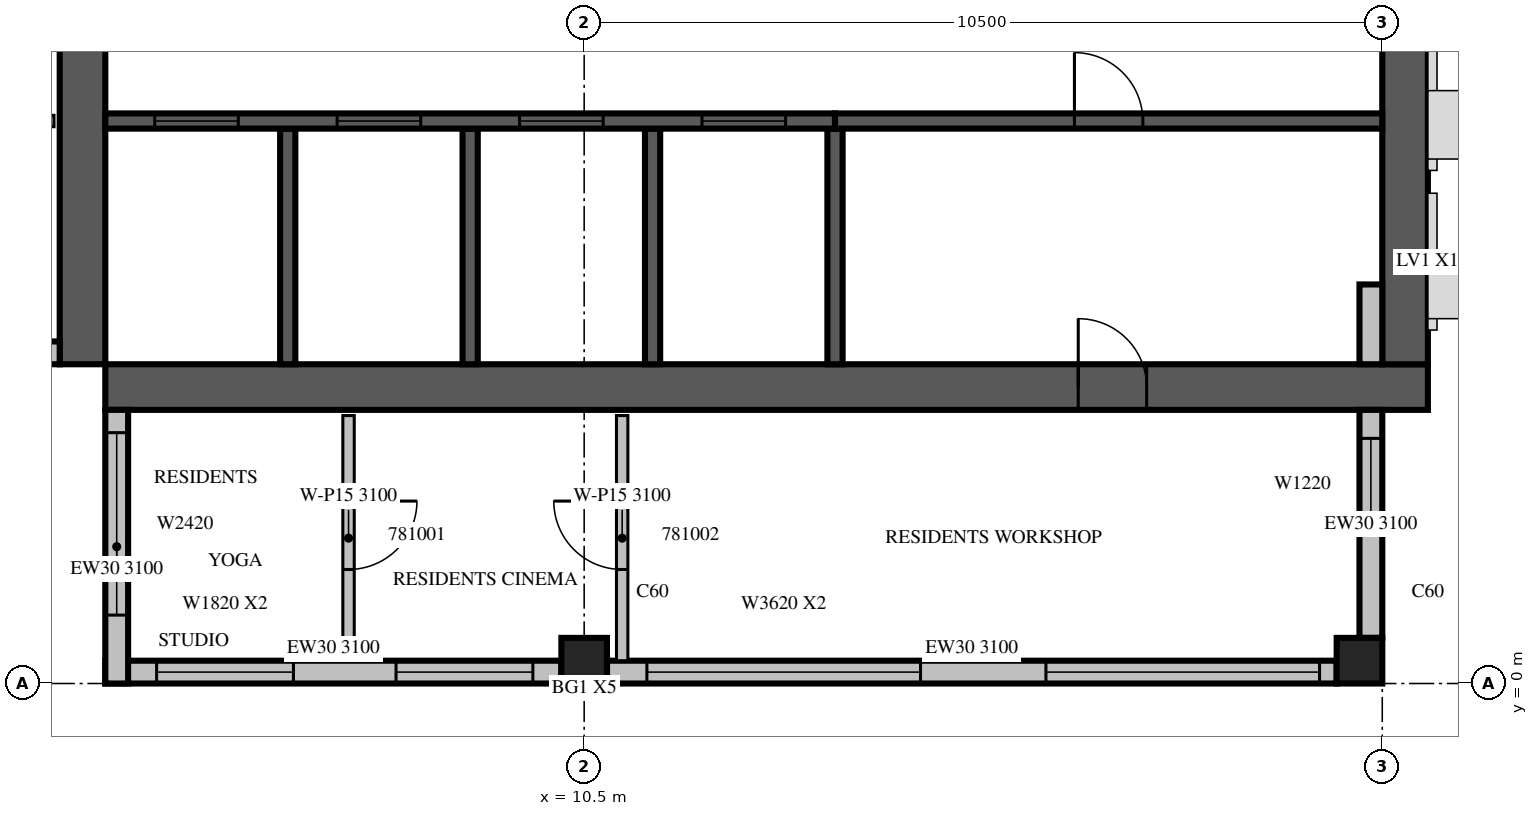
"""IFC4 building model, lengths in metres.
Left out: names, types, materials, properties, quantities, classifications, styles, units other than length and angle.
Written with IfcOpenShell. Run it as: python <this file> out.ifc"""

import sys

from ifc_helpers import new_model, si_unit, direction, frame, frame_2d, origin, origin_2d, place, context, subcontext, project, spatial, rectangle, extrude, source, transform, mapped, element, fill, save


model = new_model("IFC4")
c1 = context("Model", 3, precision=1e-05, world=origin(), true_north=direction((0.0, 1.0)))
c2 = subcontext(c1, "Body", "Model", "MODEL_VIEW")
j1 = project(units=[si_unit("LENGTHUNIT", "METRE"), si_unit("PLANEANGLEUNIT", "RADIAN")], contexts=[c1])
p1 = place(None, origin())
s1 = spatial("IfcSite", under=j1, at=p1, CompositionType="ELEMENT")
p2 = place(p1, origin())
s2 = spatial("IfcBuilding", under=s1, at=p2, CompositionType="ELEMENT")
p3 = place(p2, frame((0.0, 0.0, 344.0)))
s3 = spatial("IfcBuildingStorey", under=s2, at=p3, CompositionType="ELEMENT", Elevation=344.0)
m1 = source(origin(), c2, "Body", "SweptSolid", [
    extrude(rectangle(XDim=0.6, YDim=0.6, at=origin_2d()), origin(), (0.0, 0.0, 1.0), 3.5),
])
for number, where, z_axis, x_axis in (
    (1, (10.5, 0.3, 0.0), (0.0, 0.0, 1.0), (1.0, 0.0, 0.0)),
    (2, (20.7, 0.3, 0.0), (0.0, 0.0, 1.0), (1.0, 0.0, 0.0)),
):
    element("IfcColumn", number, at=place(p3, frame(where, z_axis=z_axis, x_axis=x_axis)), inside=s3, PredefinedType="COLUMN", context=c2, shape_type="MappedRepresentation", body=[
        mapped(m1, transform((0.0, 0.0, 0.0), scale=1.0)),
    ])
m2 = source(origin(), c2, "Body", "SweptSolid", [
    extrude(rectangle(XDim=17.4, YDim=0.6, at=frame_2d((8.7, 0.0))), origin(), (0.0, 0.0, 1.0), 3.5),
])
p4 = place(p3, frame((3.9, 4.2, 0.0), z_axis=(0.0, 0.0, 1.0), x_axis=(0.0, 1.0, 0.0)))
e3 = element("IfcWall", 3, at=p4, inside=s3, PredefinedType="SHEAR", context=c2, shape_type="MappedRepresentation", body=[
    mapped(m2, transform((0.0, 0.0, 0.0), scale=1.0)),
])
m3 = source(origin(), c2, "Body", "SweptSolid", [
    extrude(rectangle(XDim=2.2, YDim=2.1, at=frame_2d((1.1, 1.05))), frame((0.0, 0.31, 0.0), z_axis=(0.0, -1.0, 0.0), x_axis=(1.0, 0.0, 0.0)), (0.0, 0.0, 1.0), 0.62),
])
p5 = place(p4, frame((4.2, 0.0, 0.0)))
e4 = element("IfcOpeningElement", 4, at=p5, cuts=e3, PredefinedType="OPENING", context=c2, shape_type="MappedRepresentation", body=[
    mapped(m3, transform((0.0, 0.0, 0.0), scale=1.0)),
])
p6 = place(p3, frame((4.2, 3.9, 0.0), z_axis=(0.0, 0.0, 1.0), x_axis=(1.0, 0.0, 0.0)))
e5 = element("IfcWall", 5, at=p6, inside=s3, PredefinedType="SHEAR", context=c2, shape_type="MappedRepresentation", body=[
    mapped(m2, transform((0.0, 0.0, 0.0), scale=1.0)),
])
m4 = source(origin(), c2, "Body", "SweptSolid", [
    extrude(rectangle(XDim=0.9, YDim=2.1, at=frame_2d((0.45, 1.05))), frame((0.0, 0.31, 0.0), z_axis=(0.0, -1.0, 0.0), x_axis=(1.0, 0.0, 0.0)), (0.0, 0.0, 1.0), 0.62),
])
p7 = place(p6, frame((12.8, 0.0, 0.0)))
e6 = element("IfcOpeningElement", 6, at=p7, cuts=e5, PredefinedType="OPENING", context=c2, shape_type="MappedRepresentation", body=[
    mapped(m4, transform((0.0, 0.0, 0.0), scale=1.0)),
])
m5 = source(origin(), c2, "Body", "SweptSolid", [
    extrude(rectangle(XDim=16.8, YDim=0.6, at=frame_2d((8.4, 0.0))), origin(), (0.0, 0.0, 1.0), 3.5),
])
p8 = place(p3, frame((21.3, 4.2, 0.0), z_axis=(0.0, 0.0, 1.0), x_axis=(0.0, 1.0, 0.0)))
e7 = element("IfcWall", 7, at=p8, inside=s3, PredefinedType="SHEAR", context=c2, shape_type="MappedRepresentation", body=[
    mapped(m5, transform((0.0, 0.0, 0.0), scale=1.0)),
])
m6 = source(origin(), c2, "Body", "SweptSolid", [
    extrude(rectangle(XDim=1.2, YDim=2.4, at=frame_2d((0.6, 1.2))), frame((0.0, 0.31, 0.0), z_axis=(0.0, -1.0, 0.0), x_axis=(1.0, 0.0, 0.0)), (0.0, 0.0, 1.0), 0.62),
])
p9 = place(p8, frame((12.0, 0.0, 0.6)))
e8 = element("IfcOpeningElement", 8, at=p9, cuts=e7, PredefinedType="OPENING", context=c2, shape_type="MappedRepresentation", body=[
    mapped(m6, transform((0.0, 0.0, 0.0), scale=1.0)),
])
m7 = source(origin(), c2, "Body", "SweptSolid", [
    extrude(rectangle(XDim=6.0, YDim=0.3, at=frame_2d((3.0, 0.0))), origin(), (0.0, 0.0, 1.0), 3.1),
])
p10 = place(p3, frame((4.2, 0.15, 0.0), z_axis=(0.0, 0.0, 1.0), x_axis=(1.0, 0.0, 0.0)))
e9 = element("IfcWall", 9, at=p10, inside=s3, PredefinedType="STANDARD", context=c2, shape_type="MappedRepresentation", body=[
    mapped(m7, transform((0.0, 0.0, 0.0), scale=1.0)),
])
m8 = source(origin(), c2, "Body", "SweptSolid", [
    extrude(rectangle(XDim=1.8, YDim=2.0, at=frame_2d((0.9, 1.0))), frame((0.0, 0.16, 0.0), z_axis=(0.0, -1.0, 0.0), x_axis=(1.0, 0.0, 0.0)), (0.0, 0.0, 1.0), 0.32),
])
p11 = place(p10, frame((0.675, 0.0, 0.6)))
e10 = element("IfcOpeningElement", 10, at=p11, cuts=e9, PredefinedType="OPENING", context=c2, shape_type="MappedRepresentation", body=[
    mapped(m8, transform((0.0, 0.0, 0.0), scale=1.0)),
])
p12 = place(p10, frame((3.825, 0.0, 0.6)))
e11 = element("IfcOpeningElement", 11, at=p12, cuts=e9, PredefinedType="OPENING", context=c2, shape_type="MappedRepresentation", body=[
    mapped(m8, transform((0.0, 0.0, 0.0), scale=1.0)),
])
m9 = source(origin(), c2, "Body", "SweptSolid", [
    extrude(rectangle(XDim=9.6, YDim=0.3, at=frame_2d((4.8, 0.0))), origin(), (0.0, 0.0, 1.0), 3.1),
])
p13 = place(p3, frame((10.8, 0.15, 0.0), z_axis=(0.0, 0.0, 1.0), x_axis=(1.0, 0.0, 0.0)))
e12 = element("IfcWall", 12, at=p13, inside=s3, PredefinedType="STANDARD", context=c2, shape_type="MappedRepresentation", body=[
    mapped(m9, transform((0.0, 0.0, 0.0), scale=1.0)),
])
m10 = source(origin(), c2, "Body", "SweptSolid", [
    extrude(rectangle(XDim=3.6, YDim=2.0, at=frame_2d((1.8, 1.0))), frame((0.0, 0.16, 0.0), z_axis=(0.0, -1.0, 0.0), x_axis=(1.0, 0.0, 0.0)), (0.0, 0.0, 1.0), 0.32),
])
p14 = place(p13, frame((0.525, 0.0, 0.6)))
e13 = element("IfcOpeningElement", 13, at=p14, cuts=e12, PredefinedType="OPENING", context=c2, shape_type="MappedRepresentation", body=[
    mapped(m10, transform((0.0, 0.0, 0.0), scale=1.0)),
])
p15 = place(p13, frame((5.775, 0.0, 0.6)))
e14 = element("IfcOpeningElement", 14, at=p15, cuts=e12, PredefinedType="OPENING", context=c2, shape_type="MappedRepresentation", body=[
    mapped(m10, transform((0.0, 0.0, 0.0), scale=1.0)),
])
m11 = source(origin(), c2, "Body", "SweptSolid", [
    extrude(rectangle(XDim=3.0, YDim=0.3, at=frame_2d((1.5, 0.0))), origin(), (0.0, 0.0, 1.0), 3.1),
])
p16 = place(p3, frame((20.85, 0.6, 0.0), z_axis=(0.0, 0.0, 1.0), x_axis=(0.0, 1.0, 0.0)))
e15 = element("IfcWall", 15, at=p16, inside=s3, PredefinedType="STANDARD", context=c2, shape_type="MappedRepresentation", body=[
    mapped(m11, transform((0.0, 0.0, 0.0), scale=1.0)),
])
m12 = source(origin(), c2, "Body", "SweptSolid", [
    extrude(rectangle(XDim=1.2, YDim=2.0, at=frame_2d((0.6, 1.0))), frame((0.0, 0.16, 0.0), z_axis=(0.0, -1.0, 0.0), x_axis=(1.0, 0.0, 0.0)), (0.0, 0.0, 1.0), 0.32),
])
p17 = place(p16, frame((1.425, 0.0, 0.6)))
e16 = element("IfcOpeningElement", 16, at=p17, cuts=e15, PredefinedType="OPENING", context=c2, shape_type="MappedRepresentation", body=[
    mapped(m12, transform((0.0, 0.0, 0.0), scale=1.0)),
])
m13 = source(origin(), c2, "Body", "SweptSolid", [
    extrude(rectangle(XDim=1.05, YDim=0.3, at=frame_2d((0.525, 0.0))), origin(), (0.0, 0.0, 1.0), 3.1),
])
p18 = place(p3, frame((20.85, 4.2, 0.0), z_axis=(0.0, 0.0, 1.0), x_axis=(0.0, 1.0, 0.0)))
e17 = element("IfcWall", 17, at=p18, inside=s3, PredefinedType="STANDARD", context=c2, shape_type="MappedRepresentation", body=[
    mapped(m13, transform((0.0, 0.0, 0.0), scale=1.0)),
])
m14 = source(origin(), c2, "Body", "SweptSolid", [
    extrude(rectangle(XDim=3.6, YDim=0.3, at=frame_2d((1.8, 0.0))), origin(), (0.0, 0.0, 1.0), 3.1),
])
p19 = place(p3, frame((0.0, 4.35, 0.0), z_axis=(0.0, 0.0, 1.0), x_axis=(1.0, 0.0, 0.0)))
e18 = element("IfcWall", 18, at=p19, inside=s3, PredefinedType="STANDARD", context=c2, shape_type="MappedRepresentation", body=[
    mapped(m14, transform((0.0, 0.0, 0.0), scale=1.0)),
])
m15 = source(origin(), c2, "Body", "SweptSolid", [
    extrude(rectangle(XDim=2.4, YDim=2.0, at=frame_2d((1.2, 1.0))), frame((0.0, 0.16, 0.0), z_axis=(0.0, -1.0, 0.0), x_axis=(1.0, 0.0, 0.0)), (0.0, 0.0, 1.0), 0.32),
])
p20 = place(p19, frame((0.9, 0.0, 0.6)))
e19 = element("IfcOpeningElement", 19, at=p20, cuts=e18, PredefinedType="OPENING", context=c2, shape_type="MappedRepresentation", body=[
    mapped(m15, transform((0.0, 0.0, 0.0), scale=1.0)),
])
p21 = place(p3, frame((4.35, 3.6, 0.0), z_axis=(0.0, 0.0, 1.0), x_axis=(0.0, -1.0, 0.0)))
e20 = element("IfcWall", 20, at=p21, inside=s3, PredefinedType="STANDARD", context=c2, shape_type="MappedRepresentation", body=[
    mapped(m14, transform((0.0, 0.0, 0.0), scale=1.0)),
])
p22 = place(p21, frame((0.3, 0.0, 0.6)))
e21 = element("IfcOpeningElement", 21, at=p22, cuts=e20, PredefinedType="OPENING", context=c2, shape_type="MappedRepresentation", body=[
    mapped(m15, transform((0.0, 0.0, 0.0), scale=1.0)),
])
m16 = source(origin(), c2, "Body", "SweptSolid", [
    extrude(rectangle(XDim=3.1, YDim=0.2, at=frame_2d((1.55, 0.0))), origin(), (0.0, 0.0, 1.0), 3.5),
])
for number, where, z_axis, x_axis in (
    (22, (6.6, 4.2, 0.0), (0.0, 0.0, 1.0), (0.0, 1.0, 0.0)),
    (23, (9.0, 4.2, 0.0), (0.0, 0.0, 1.0), (0.0, 1.0, 0.0)),
    (24, (11.4, 4.2, 0.0), (0.0, 0.0, 1.0), (0.0, 1.0, 0.0)),
):
    element("IfcWall", number, at=place(p3, frame(where, z_axis=z_axis, x_axis=x_axis)), inside=s3, PredefinedType="SOLIDWALL", context=c2, shape_type="MappedRepresentation", body=[
        mapped(m16, transform((0.0, 0.0, 0.0), scale=1.0)),
    ])
m17 = source(origin(), c2, "Body", "SweptSolid", [
    extrude(rectangle(XDim=3.1, YDim=0.2, at=frame_2d((1.55, 0.0))), origin(), (0.0, 0.0, 1.0), 3.1),
])
p23 = place(p3, frame((13.8, 4.2, 0.0), z_axis=(0.0, 0.0, 1.0), x_axis=(0.0, 1.0, 0.0)))
e25 = element("IfcWall", 25, at=p23, inside=s3, PredefinedType="SOLIDWALL", context=c2, shape_type="MappedRepresentation", body=[
    mapped(m17, transform((0.0, 0.0, 0.0), scale=1.0)),
])
m18 = source(origin(), c2, "Body", "SweptSolid", [
    extrude(rectangle(XDim=9.6, YDim=0.2, at=frame_2d((4.8, 0.0))), origin(), (0.0, 0.0, 1.0), 3.5),
])
p24 = place(p3, frame((4.2, 7.4, 0.0), z_axis=(0.0, 0.0, 1.0), x_axis=(1.0, 0.0, 0.0)))
e26 = element("IfcWall", 26, at=p24, inside=s3, PredefinedType="SOLIDWALL", context=c2, shape_type="MappedRepresentation", body=[
    mapped(m18, transform((0.0, 0.0, 0.0), scale=1.0)),
])
m19 = source(origin(), c2, "Body", "SweptSolid", [
    extrude(rectangle(XDim=1.1, YDim=2.1, at=frame_2d((0.55, 1.05))), frame((0.0, 0.11, 0.0), z_axis=(0.0, -1.0, 0.0), x_axis=(1.0, 0.0, 0.0)), (0.0, 0.0, 1.0), 0.22),
])
p25 = place(p24, frame((0.65, 0.0, 0.0)))
e27 = element("IfcOpeningElement", 27, at=p25, cuts=e26, PredefinedType="OPENING", context=c2, shape_type="MappedRepresentation", body=[
    mapped(m19, transform((0.0, 0.0, 0.0), scale=1.0)),
])
p26 = place(p24, frame((3.05, 0.0, 0.0)))
e28 = element("IfcOpeningElement", 28, at=p26, cuts=e26, PredefinedType="OPENING", context=c2, shape_type="MappedRepresentation", body=[
    mapped(m19, transform((0.0, 0.0, 0.0), scale=1.0)),
])
p27 = place(p24, frame((5.45, 0.0, 0.0)))
e29 = element("IfcOpeningElement", 29, at=p27, cuts=e26, PredefinedType="OPENING", context=c2, shape_type="MappedRepresentation", body=[
    mapped(m19, transform((0.0, 0.0, 0.0), scale=1.0)),
])
p28 = place(p24, frame((7.85, 0.0, 0.0)))
e30 = element("IfcOpeningElement", 30, at=p28, cuts=e26, PredefinedType="OPENING", context=c2, shape_type="MappedRepresentation", body=[
    mapped(m19, transform((0.0, 0.0, 0.0), scale=1.0)),
])
m20 = source(origin(), c2, "Body", "SweptSolid", [
    extrude(rectangle(XDim=7.2, YDim=0.2, at=frame_2d((3.6, 0.0))), origin(), (0.0, 0.0, 1.0), 3.1),
])
p29 = place(p3, frame((13.8, 7.4, 0.0), z_axis=(0.0, 0.0, 1.0), x_axis=(1.0, 0.0, 0.0)))
e31 = element("IfcWall", 31, at=p29, inside=s3, PredefinedType="SOLIDWALL", context=c2, shape_type="MappedRepresentation", body=[
    mapped(m20, transform((0.0, 0.0, 0.0), scale=1.0)),
])
m21 = source(origin(), c2, "Body", "SweptSolid", [
    extrude(rectangle(XDim=0.9, YDim=2.1, at=frame_2d((0.45, 1.05))), frame((0.0, 0.11, 0.0), z_axis=(0.0, -1.0, 0.0), x_axis=(1.0, 0.0, 0.0)), (0.0, 0.0, 1.0), 0.22),
])
p30 = place(p29, frame((3.15, 0.0, 0.0)))
e32 = element("IfcOpeningElement", 32, at=p30, cuts=e31, PredefinedType="OPENING", context=c2, shape_type="MappedRepresentation", body=[
    mapped(m21, transform((0.0, 0.0, 0.0), scale=1.0)),
])
m22 = source(origin(), c2, "Body", "SweptSolid", [
    extrude(rectangle(XDim=3.225, YDim=0.15, at=frame_2d((1.613, 0.0))), origin(), (0.0, 0.0, 1.0), 3.1),
])
p31 = place(p3, frame((7.4, 3.525, 0.0), z_axis=(0.0, 0.0, 1.0), x_axis=(0.0, -1.0, 0.0)))
e33 = element("IfcWall", 33, at=p31, inside=s3, PredefinedType="PARTITIONING", context=c2, shape_type="MappedRepresentation", body=[
    mapped(m22, transform((0.0, 0.0, 0.0), scale=1.0)),
])
m23 = source(origin(), c2, "Body", "SweptSolid", [
    extrude(rectangle(XDim=0.9, YDim=2.1, at=frame_2d((0.45, 1.05))), frame((0.0, 0.085, 0.0), z_axis=(0.0, -1.0, 0.0), x_axis=(1.0, 0.0, 0.0)), (0.0, 0.0, 1.0), 0.17),
])
p32 = place(p31, frame((1.125, 0.0, 0.0)))
e34 = element("IfcOpeningElement", 34, at=p32, cuts=e33, PredefinedType="OPENING", context=c2, shape_type="MappedRepresentation", body=[
    mapped(m23, transform((0.0, 0.0, 0.0), scale=1.0)),
])
p33 = place(p3, frame((11.0, 3.525, 0.0), z_axis=(0.0, 0.0, 1.0), x_axis=(0.0, -1.0, 0.0)))
e35 = element("IfcWall", 35, at=p33, inside=s3, PredefinedType="PARTITIONING", context=c2, shape_type="MappedRepresentation", body=[
    mapped(m22, transform((0.0, 0.0, 0.0), scale=1.0)),
])
p34 = place(p33, frame((1.125, 0.0, 0.0)))
e36 = element("IfcOpeningElement", 36, at=p34, cuts=e35, PredefinedType="OPENING", context=c2, shape_type="MappedRepresentation", body=[
    mapped(m23, transform((0.0, 0.0, 0.0), scale=1.0)),
])
p35 = place(p3, frame((0.3, 7.4, 0.0), z_axis=(0.0, 0.0, 1.0), x_axis=(1.0, 0.0, 0.0)))
e37 = element("IfcWall", 37, at=p35, inside=s3, PredefinedType="PARTITIONING", context=c2, shape_type="MappedRepresentation", body=[
    mapped(m22, transform((0.0, 0.0, 0.0), scale=1.0)),
])
p36 = place(p35, frame((1.2, 0.0, 0.0)))
e38 = element("IfcOpeningElement", 38, at=p36, cuts=e37, PredefinedType="OPENING", context=c2, shape_type="MappedRepresentation", body=[
    mapped(m23, transform((0.0, 0.0, 0.0), scale=1.0)),
])
m24 = source(origin(), c2, "Body", "SweptSolid", [
    extrude(rectangle(XDim=1.8, YDim=2.0, at=frame_2d((0.9, 1.0))), frame((0.0, 0.03, 0.0), z_axis=(0.0, -1.0, 0.0), x_axis=(1.0, 0.0, 0.0)), (0.0, 0.0, 1.0), 0.06),
])
p37 = place(p11, origin())
e39 = element("IfcWindow", 39, at=p37, inside=s3, PartitioningType="SINGLE_PANEL", PredefinedType="WINDOW", context=c2, shape_type="MappedRepresentation", body=[
    mapped(m24, transform((0.0, 0.0, 0.0), scale=1.0)),
])
fill(e10, e39)
p38 = place(p12, origin())
e40 = element("IfcWindow", 40, at=p38, inside=s3, PartitioningType="SINGLE_PANEL", PredefinedType="WINDOW", context=c2, shape_type="MappedRepresentation", body=[
    mapped(m24, transform((0.0, 0.0, 0.0), scale=1.0)),
])
fill(e11, e40)
m25 = source(origin(), c2, "Body", "SweptSolid", [
    extrude(rectangle(XDim=3.6, YDim=2.0, at=frame_2d((1.8, 1.0))), frame((0.0, 0.03, 0.0), z_axis=(0.0, -1.0, 0.0), x_axis=(1.0, 0.0, 0.0)), (0.0, 0.0, 1.0), 0.06),
])
p39 = place(p14, origin())
e41 = element("IfcWindow", 41, at=p39, inside=s3, PartitioningType="SINGLE_PANEL", PredefinedType="WINDOW", context=c2, shape_type="MappedRepresentation", body=[
    mapped(m25, transform((0.0, 0.0, 0.0), scale=1.0)),
])
fill(e13, e41)
p40 = place(p15, origin())
e42 = element("IfcWindow", 42, at=p40, inside=s3, PartitioningType="SINGLE_PANEL", PredefinedType="WINDOW", context=c2, shape_type="MappedRepresentation", body=[
    mapped(m25, transform((0.0, 0.0, 0.0), scale=1.0)),
])
fill(e14, e42)
m26 = source(origin(), c2, "Body", "SweptSolid", [
    extrude(rectangle(XDim=1.2, YDim=2.0, at=frame_2d((0.6, 1.0))), frame((0.0, 0.03, 0.0), z_axis=(0.0, -1.0, 0.0), x_axis=(1.0, 0.0, 0.0)), (0.0, 0.0, 1.0), 0.06),
])
p41 = place(p17, origin())
e43 = element("IfcWindow", 43, at=p41, inside=s3, PartitioningType="SINGLE_PANEL", PredefinedType="WINDOW", context=c2, shape_type="MappedRepresentation", body=[
    mapped(m26, transform((0.0, 0.0, 0.0), scale=1.0)),
])
fill(e16, e43)
m27 = source(origin(), c2, "Body", "SweptSolid", [
    extrude(rectangle(XDim=2.4, YDim=2.0, at=frame_2d((1.2, 1.0))), frame((0.0, 0.03, 0.0), z_axis=(0.0, -1.0, 0.0), x_axis=(1.0, 0.0, 0.0)), (0.0, 0.0, 1.0), 0.06),
])
p42 = place(p22, origin())
e44 = element("IfcWindow", 44, at=p42, inside=s3, PartitioningType="SINGLE_PANEL", PredefinedType="WINDOW", context=c2, shape_type="MappedRepresentation", body=[
    mapped(m27, transform((0.0, 0.0, 0.0), scale=1.0)),
])
fill(e21, e44)
m28 = source(origin(), c2, "Body", "SweptSolid", [
    extrude(rectangle(XDim=1.1, YDim=2.1, at=frame_2d((0.55, 1.05))), frame((0.0, 0.025, 0.0), z_axis=(0.0, -1.0, 0.0), x_axis=(1.0, 0.0, 0.0)), (0.0, 0.0, 1.0), 0.05),
])
p43 = place(p25, origin())
e45 = element("IfcDoor", 45, at=p43, inside=s3, OperationType="SLIDING_TO_LEFT", PredefinedType="DOOR", context=c2, shape_type="MappedRepresentation", body=[
    mapped(m28, transform((0.0, 0.0, 0.0), scale=1.0)),
])
fill(e27, e45)
p44 = place(p26, origin())
e46 = element("IfcDoor", 46, at=p44, inside=s3, OperationType="SLIDING_TO_LEFT", PredefinedType="DOOR", context=c2, shape_type="MappedRepresentation", body=[
    mapped(m28, transform((0.0, 0.0, 0.0), scale=1.0)),
])
fill(e28, e46)
p45 = place(p27, origin())
e47 = element("IfcDoor", 47, at=p45, inside=s3, OperationType="SLIDING_TO_LEFT", PredefinedType="DOOR", context=c2, shape_type="MappedRepresentation", body=[
    mapped(m28, transform((0.0, 0.0, 0.0), scale=1.0)),
])
fill(e29, e47)
p46 = place(p28, origin())
e48 = element("IfcDoor", 48, at=p46, inside=s3, OperationType="SLIDING_TO_LEFT", PredefinedType="DOOR", context=c2, shape_type="MappedRepresentation", body=[
    mapped(m28, transform((0.0, 0.0, 0.0), scale=1.0)),
])
fill(e30, e48)
m29 = source(origin(), c2, "Body", "SweptSolid", [
    extrude(rectangle(XDim=0.9, YDim=2.1, at=frame_2d((0.45, 1.05))), frame((0.0, 0.025, 0.0), z_axis=(0.0, -1.0, 0.0), x_axis=(1.0, 0.0, 0.0)), (0.0, 0.0, 1.0), 0.05),
])
p47 = place(p30, origin())
e49 = element("IfcDoor", 49, at=p47, inside=s3, OperationType="SINGLE_SWING_LEFT", PredefinedType="DOOR", context=c2, shape_type="MappedRepresentation", body=[
    mapped(m29, transform((0.0, 0.0, 0.0), scale=1.0)),
])
fill(e32, e49)
p48 = place(p7, origin())
e50 = element("IfcDoor", 50, at=p48, inside=s3, OperationType="SINGLE_SWING_LEFT", PredefinedType="DOOR", context=c2, shape_type="MappedRepresentation", body=[
    mapped(m29, transform((0.0, 0.0, 0.0), scale=1.0)),
])
fill(e6, e50)
p49 = place(p32, origin())
e51 = element("IfcDoor", 51, at=p49, inside=s3, OperationType="SINGLE_SWING_LEFT", PredefinedType="DOOR", context=c2, shape_type="MappedRepresentation", body=[
    mapped(m29, transform((0.0, 0.0, 0.0), scale=1.0)),
])
fill(e34, e51)
p50 = place(p34, origin())
e52 = element("IfcDoor", 52, at=p50, inside=s3, OperationType="SINGLE_SWING_RIGHT", PredefinedType="DOOR", context=c2, shape_type="MappedRepresentation", body=[
    mapped(m29, transform((0.0, 0.0, 0.0), scale=1.0)),
])
fill(e36, e52)
save(model, sys.argv[1])
